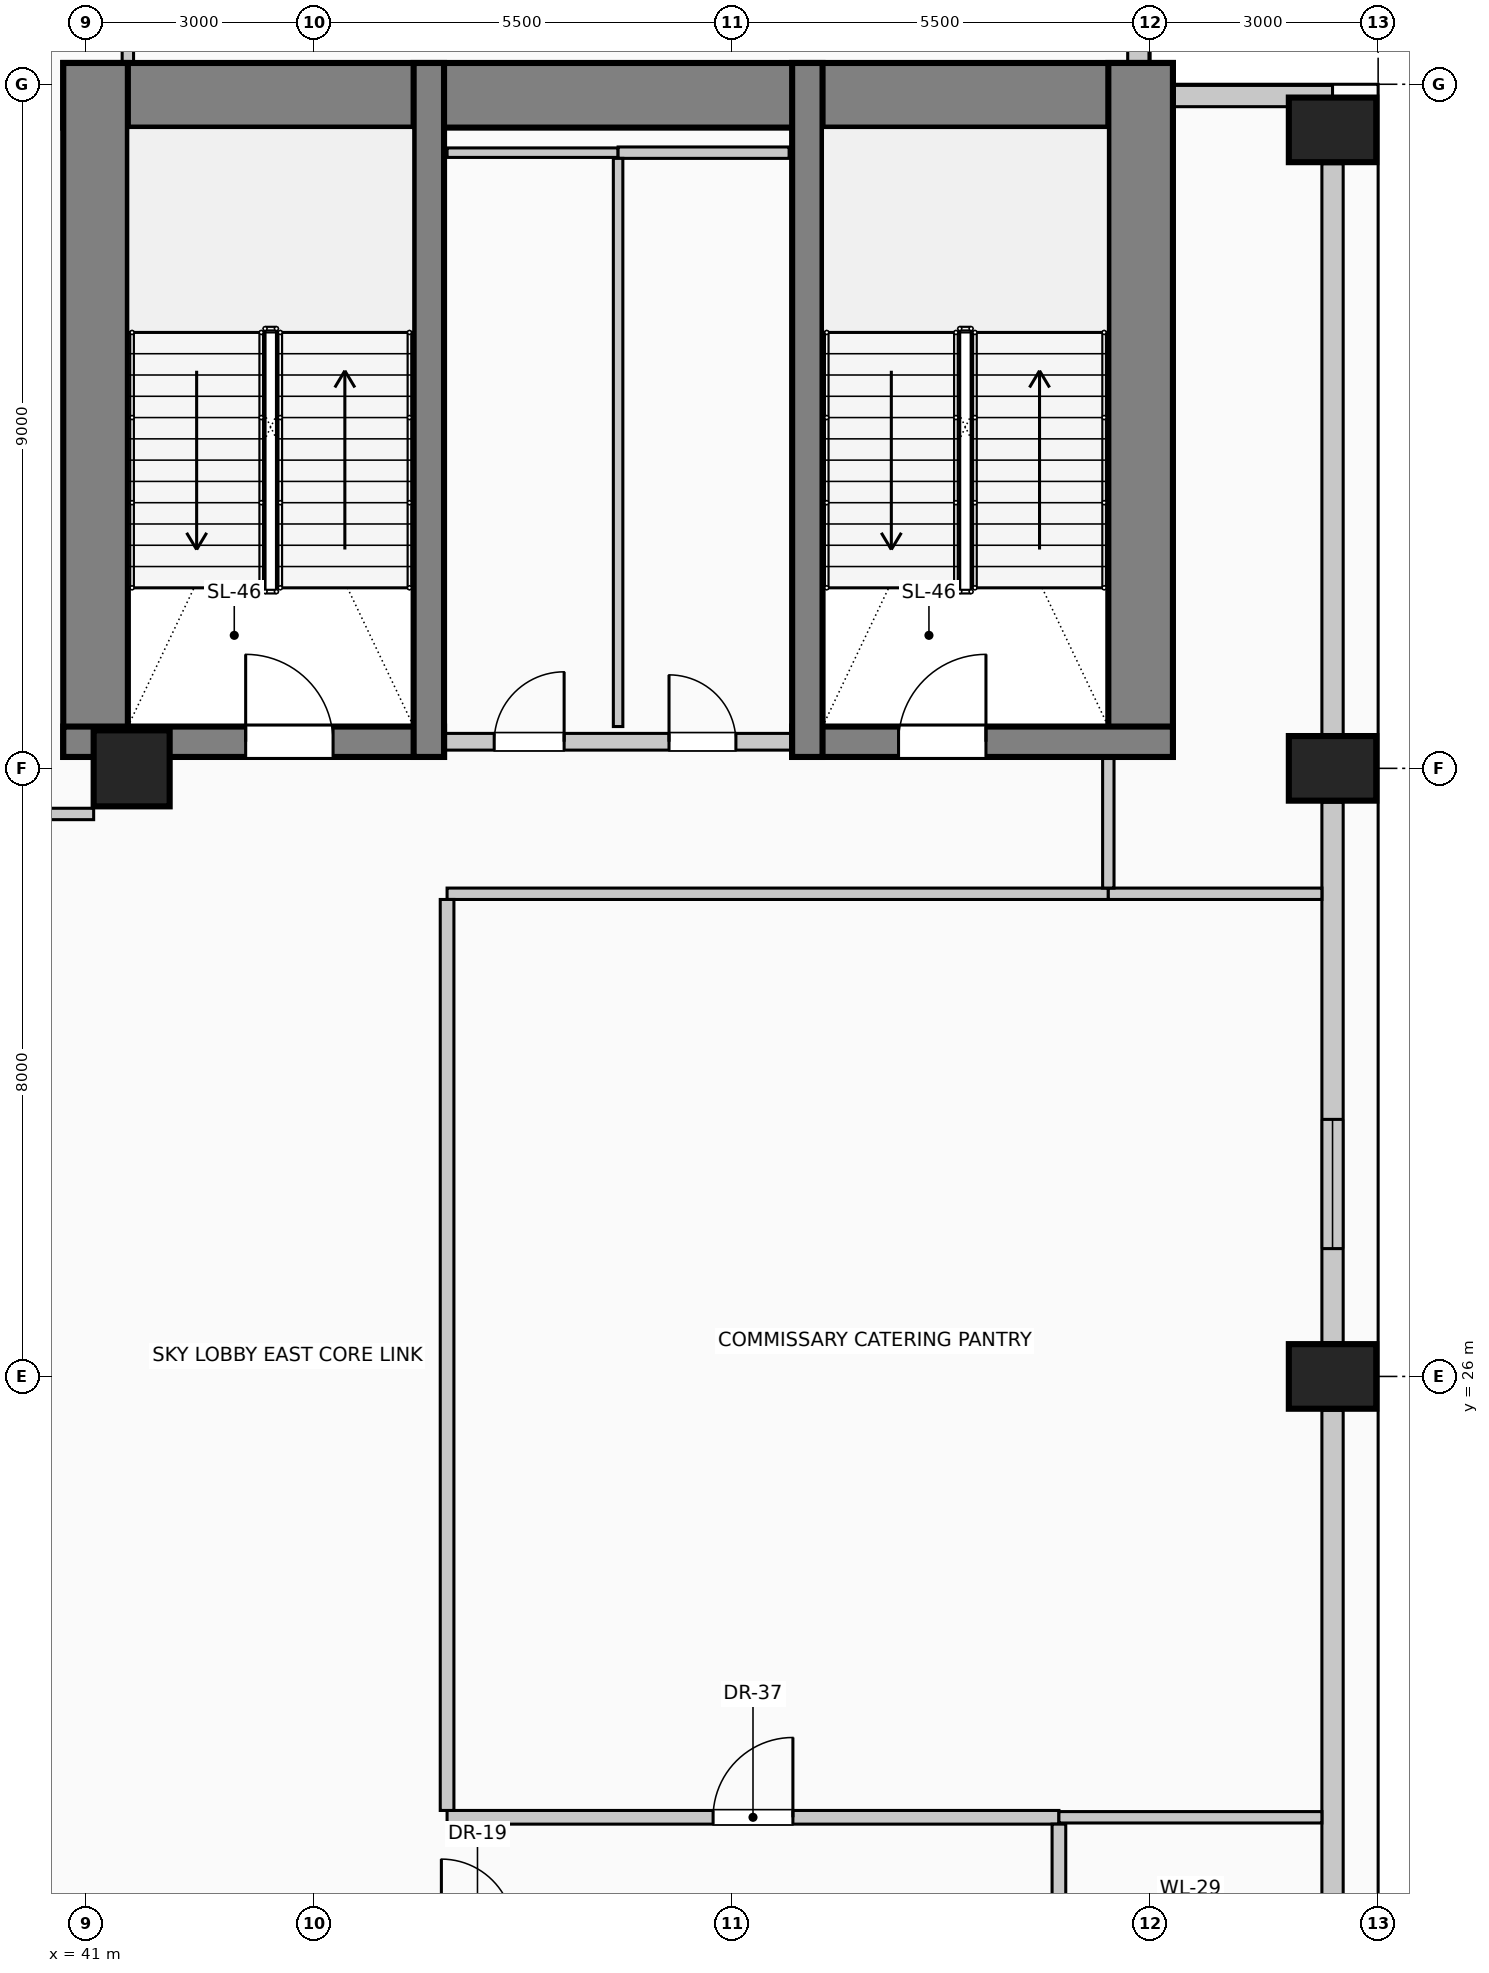
"""IFC4 building model, lengths in metres.
Left out: names, types, materials, properties, quantities, classifications, styles, units other than length and angle.
Written with IfcOpenShell. Run it as: python <this file> out.ifc"""

import sys

from ifc_helpers import new_model, si_unit, direction, frame, frame_2d, origin, origin_2d, place, context, subcontext, project, spatial, rectangle, circle, extrude, element, fill, save


model = new_model("IFC4")
c1 = context("Model", 3, precision=1e-05, world=origin(), true_north=direction((0.0, 1.0)))
c2 = subcontext(c1, "Body", "Model", "MODEL_VIEW")
j1 = project(units=[si_unit("LENGTHUNIT", "METRE"), si_unit("PLANEANGLEUNIT", "RADIAN")], contexts=[c1])
p1 = place(None, origin())
s1 = spatial("IfcSite", under=j1, at=p1, CompositionType="ELEMENT")
p2 = place(p1, origin())
s2 = spatial("IfcBuilding", under=s1, at=p2, CompositionType="ELEMENT")
p3 = place(p2, frame((0.0, 0.0, 87.8)))
s3 = spatial("IfcBuildingStorey", under=s2, at=p3, CompositionType="ELEMENT", Elevation=87.8)
p4 = place(p3, frame((40.7, 42.855, 0.0), z_axis=(0.0, 0.0, 1.0), x_axis=(1.0, 0.0, 0.0)))
e1 = element("IfcWall", 1, at=p4, inside=s3, PredefinedType="SHEAR", context=c2, shape_type="SweptSolid", body=[
    extrude(rectangle(XDim=14.6, YDim=0.85, at=frame_2d((7.3, 0.0))), origin(), (0.0, 0.0, 1.0), 4.8),
])
for number, where, z_axis, x_axis in (
    (2, (41.125, 34.15, 0.0), (0.0, 0.0, 1.0), (0.0, 1.0, 0.0)),
    (3, (54.875, 34.15, 0.0), (0.0, 0.0, 1.0), (0.0, 1.0, 0.0)),
):
    element("IfcWall", number, at=place(p3, frame(where, z_axis=z_axis, x_axis=x_axis)), inside=s3, PredefinedType="SHEAR", context=c2, shape_type="SweptSolid", body=[
        extrude(rectangle(XDim=9.13, YDim=0.85, at=frame_2d((4.565, 0.0))), origin(), (0.0, 0.0, 1.0), 4.8),
    ])
p5 = place(p3, frame((40.7, 34.35, 0.0), z_axis=(0.0, 0.0, 1.0), x_axis=(1.0, 0.0, 0.0)))
e4 = element("IfcWall", 4, at=p5, inside=s3, PredefinedType="SHEAR", context=c2, shape_type="SweptSolid", body=[
    extrude(rectangle(XDim=5.01, YDim=0.4, at=frame_2d((2.505, 0.0))), origin(), (0.0, 0.0, 1.0), 4.8),
])
p6 = place(p5, frame((2.4, 0.0, 0.0)))
e5 = element("IfcOpeningElement", 5, at=p6, cuts=e4, PredefinedType="OPENING", context=c2, shape_type="SweptSolid", body=[
    extrude(rectangle(XDim=1.15, YDim=2.2, at=frame_2d((0.575, 1.1))), frame((0.0, 0.21, 0.0), z_axis=(0.0, -1.0, 0.0), x_axis=(1.0, 0.0, 0.0)), (0.0, 0.0, 1.0), 0.42),
])
p7 = place(p3, frame((45.51, 34.15, 0.0), z_axis=(0.0, 0.0, 1.0), x_axis=(0.0, 1.0, 0.0)))
e6 = element("IfcWall", 6, at=p7, inside=s3, PredefinedType="SHEAR", context=c2, shape_type="SweptSolid", body=[
    extrude(rectangle(XDim=9.13, YDim=0.4, at=frame_2d((4.565, 0.0))), origin(), (0.0, 0.0, 1.0), 4.8),
])
p8 = place(p3, frame((50.29, 34.35, 0.0), z_axis=(0.0, 0.0, 1.0), x_axis=(1.0, 0.0, 0.0)))
e7 = element("IfcWall", 7, at=p8, inside=s3, PredefinedType="SHEAR", context=c2, shape_type="SweptSolid", body=[
    extrude(rectangle(XDim=5.01, YDim=0.4, at=frame_2d((2.505, 0.0))), origin(), (0.0, 0.0, 1.0), 4.8),
])
p9 = place(p8, frame((1.4, 0.0, 0.0)))
e8 = element("IfcOpeningElement", 8, at=p9, cuts=e7, PredefinedType="OPENING", context=c2, shape_type="SweptSolid", body=[
    extrude(rectangle(XDim=1.15, YDim=2.2, at=frame_2d((0.575, 1.1))), frame((0.0, 0.21, 0.0), z_axis=(0.0, -1.0, 0.0), x_axis=(1.0, 0.0, 0.0)), (0.0, 0.0, 1.0), 0.42),
])
p10 = place(p3, frame((50.49, 34.15, 0.0), z_axis=(0.0, 0.0, 1.0), x_axis=(0.0, 1.0, 0.0)))
e9 = element("IfcWall", 9, at=p10, inside=s3, PredefinedType="SHEAR", context=c2, shape_type="SweptSolid", body=[
    extrude(rectangle(XDim=9.13, YDim=0.4, at=frame_2d((4.565, 0.0))), origin(), (0.0, 0.0, 1.0), 4.8),
])
for number, where, z_axis, x_axis in (
    (10, (57.4, 26.0, 0.0), (0.0, 0.0, 1.0), (0.0, 1.0, 0.0)),
    (11, (57.4, 34.0, 0.0), (0.0, 0.0, 1.0), (0.0, 1.0, 0.0)),
    (12, (57.4, 42.4, 0.0), (0.0, 0.0, 1.0), (0.0, 1.0, 0.0)),
):
    element("IfcColumn", number, at=place(p3, frame(where, z_axis=z_axis, x_axis=x_axis)), inside=s3, PredefinedType="COLUMN", context=c2, shape_type="SweptSolid", body=[
        extrude(rectangle(XDim=0.85, YDim=1.15, at=origin_2d()), origin(), (0.0, 0.0, 1.0), 4.8),
    ])
p11 = place(p3, frame((41.6, 34.0, 0.0), z_axis=(0.0, 0.0, 1.0), x_axis=(1.0, 0.0, 0.0)))
e13 = element("IfcColumn", 13, at=p11, inside=s3, PredefinedType="COLUMN", context=c2, shape_type="SweptSolid", body=[
    extrude(circle(Radius=0.5, at=origin_2d()), origin(), (0.0, 0.0, 1.0), 4.8),
])
p12 = place(p3, frame((57.4, 25.555, 0.0), z_axis=(0.0, 0.0, 1.0), x_axis=(0.0, -1.0, 0.0)))
e14 = element("IfcWall", 14, at=p12, inside=s3, PredefinedType="SOLIDWALL", context=c2, shape_type="SweptSolid", body=[
    extrude(rectangle(XDim=7.11, YDim=0.28, at=frame_2d((3.555, 0.0))), origin(), (0.0, 0.0, 1.0), 3.675),
])
p13 = place(p3, frame((57.4, 33.555, 0.0), z_axis=(0.0, 0.0, 1.0), x_axis=(0.0, -1.0, 0.0)))
e15 = element("IfcWall", 15, at=p13, inside=s3, PredefinedType="SOLIDWALL", context=c2, shape_type="SweptSolid", body=[
    extrude(rectangle(XDim=7.11, YDim=0.28, at=frame_2d((3.555, 0.0))), origin(), (0.0, 0.0, 1.0), 3.675),
])
p14 = place(p13, frame((4.173, 0.0, 0.5)))
e16 = element("IfcOpeningElement", 16, at=p14, cuts=e15, PredefinedType="OPENING", context=c2, shape_type="SweptSolid", body=[
    extrude(rectangle(XDim=1.7, YDim=1.95, at=frame_2d((0.85, 0.975))), frame((0.0, 0.15, 0.0), z_axis=(0.0, -1.0, 0.0), x_axis=(1.0, 0.0, 0.0)), (0.0, 0.0, 1.0), 0.3),
])
p15 = place(p3, frame((57.4, 41.955, 0.0), z_axis=(0.0, 0.0, 1.0), x_axis=(0.0, -1.0, 0.0)))
e17 = element("IfcWall", 17, at=p15, inside=s3, PredefinedType="SOLIDWALL", context=c2, shape_type="SweptSolid", body=[
    extrude(rectangle(XDim=7.51, YDim=0.28, at=frame_2d((3.755, 0.0))), origin(), (0.0, 0.0, 1.0), 3.675),
])
p16 = place(p3, frame((54.845, 45.4, 0.0), z_axis=(0.0, 0.0, 1.0), x_axis=(0.0, -1.0, 0.0)))
e18 = element("IfcWall", 18, at=p16, inside=s3, PredefinedType="SOLIDWALL", context=c2, shape_type="SweptSolid", body=[
    extrude(rectangle(XDim=2.115, YDim=0.28, at=frame_2d((1.058, 0.0))), origin(), (0.0, 0.0, 1.0), 4.525),
])
p17 = place(p3, frame((55.305, 42.845, 0.0), z_axis=(0.0, 0.0, 1.0), x_axis=(1.0, 0.0, 0.0)))
e19 = element("IfcWall", 19, at=p17, inside=s3, PredefinedType="SOLIDWALL", context=c2, shape_type="SweptSolid", body=[
    extrude(rectangle(XDim=2.095, YDim=0.28, at=frame_2d((1.047, 0.0))), origin(), (0.0, 0.0, 1.0), 4.525),
])
p18 = place(p3, frame((45.72, 34.35, 0.0), z_axis=(0.0, 0.0, 1.0), x_axis=(1.0, 0.0, 0.0)))
e20 = element("IfcWall", 20, at=p18, inside=s3, PredefinedType="PARTITIONING", context=c2, shape_type="SweptSolid", body=[
    extrude(rectangle(XDim=4.56, YDim=0.22, at=frame_2d((2.28, 0.0))), origin(), (0.0, 0.0, 1.0), 4.525),
])
p19 = place(p18, frame((0.65, 0.0, 0.0)))
e21 = element("IfcOpeningElement", 21, at=p19, cuts=e20, PredefinedType="OPENING", context=c2, shape_type="SweptSolid", body=[
    extrude(rectangle(XDim=0.92, YDim=2.1, at=frame_2d((0.46, 1.05))), frame((0.0, 0.12, 0.0), z_axis=(0.0, -1.0, 0.0), x_axis=(1.0, 0.0, 0.0)), (0.0, 0.0, 1.0), 0.24),
])
p20 = place(p18, frame((2.95, 0.0, 0.0)))
e22 = element("IfcOpeningElement", 22, at=p20, cuts=e20, PredefinedType="OPENING", context=c2, shape_type="SweptSolid", body=[
    extrude(rectangle(XDim=0.88, YDim=2.1, at=frame_2d((0.44, 1.05))), frame((0.0, 0.12, 0.0), z_axis=(0.0, -1.0, 0.0), x_axis=(1.0, 0.0, 0.0)), (0.0, 0.0, 1.0), 0.24),
])
p21 = place(p3, frame((45.75, 20.2, 0.0), z_axis=(0.0, 0.0, 1.0), x_axis=(1.0, 0.0, 0.0)))
e23 = element("IfcWall", 23, at=p21, inside=s3, PredefinedType="PARTITIONING", context=c2, shape_type="SweptSolid", body=[
    extrude(rectangle(XDim=8.05, YDim=0.18, at=frame_2d((4.025, 0.0))), origin(), (0.0, 0.0, 1.0), 4.525),
])
p22 = place(p21, frame((3.5, 0.0, 0.0)))
e24 = element("IfcOpeningElement", 24, at=p22, cuts=e23, PredefinedType="OPENING", context=c2, shape_type="SweptSolid", body=[
    extrude(rectangle(XDim=1.05, YDim=2.15, at=frame_2d((0.525, 1.075))), frame((0.0, 0.1, 0.0), z_axis=(0.0, -1.0, 0.0), x_axis=(1.0, 0.0, 0.0)), (0.0, 0.0, 1.0), 0.2),
])
p23 = place(p3, frame((53.8, 20.2, 0.0), z_axis=(0.0, 0.0, 1.0), x_axis=(1.0, 0.0, 0.0)))
e25 = element("IfcWall", 25, at=p23, inside=s3, PredefinedType="PARTITIONING", context=c2, shape_type="SweptSolid", body=[
    extrude(rectangle(XDim=3.46, YDim=0.15, at=frame_2d((1.73, 0.0))), origin(), (0.0, 0.0, 1.0), 4.525),
])
p24 = place(p3, frame((45.75, 32.35, 0.0), z_axis=(0.0, 0.0, 1.0), x_axis=(1.0, 0.0, 0.0)))
e26 = element("IfcWall", 26, at=p24, inside=s3, PredefinedType="PARTITIONING", context=c2, shape_type="SweptSolid", body=[
    extrude(rectangle(XDim=8.7, YDim=0.15, at=frame_2d((4.35, 0.0))), origin(), (0.0, 0.0, 1.0), 4.525),
])
p25 = place(p3, frame((54.45, 32.35, 0.0), z_axis=(0.0, 0.0, 1.0), x_axis=(1.0, 0.0, 0.0)))
e27 = element("IfcWall", 27, at=p25, inside=s3, PredefinedType="PARTITIONING", context=c2, shape_type="SweptSolid", body=[
    extrude(rectangle(XDim=2.81, YDim=0.15, at=frame_2d((1.405, 0.0))), origin(), (0.0, 0.0, 1.0), 4.525),
])
p26 = place(p3, frame((29.5, 33.4, 0.0), z_axis=(0.0, 0.0, 1.0), x_axis=(1.0, 0.0, 0.0)))
e28 = element("IfcWall", 28, at=p26, inside=s3, PredefinedType="PARTITIONING", context=c2, shape_type="SweptSolid", body=[
    extrude(rectangle(XDim=11.6, YDim=0.15, at=frame_2d((5.8, 0.0))), origin(), (0.0, 0.0, 1.0), 4.525),
])
p27 = place(p3, frame((45.75, 42.1, 0.0), z_axis=(0.0, 0.0, 1.0), x_axis=(1.0, 0.0, 0.0)))
e29 = element("IfcWall", 29, at=p27, inside=s3, PredefinedType="PARTITIONING", context=c2, shape_type="SweptSolid", body=[
    extrude(rectangle(XDim=2.25, YDim=0.125, at=frame_2d((1.125, 0.0))), origin(), (0.0, 0.0, 1.0), 4.525),
])
p28 = place(p3, frame((48.0, 42.1, 0.0), z_axis=(0.0, 0.0, 1.0), x_axis=(1.0, 0.0, 0.0)))
e30 = element("IfcWall", 30, at=p28, inside=s3, PredefinedType="PARTITIONING", context=c2, shape_type="SweptSolid", body=[
    extrude(rectangle(XDim=2.25, YDim=0.15, at=frame_2d((1.125, 0.0))), origin(), (0.0, 0.0, 1.0), 4.525),
])
p29 = place(p3, frame((41.55, 43.28, 0.0), z_axis=(0.0, 0.0, 1.0), x_axis=(0.0, 1.0, 0.0)))
e31 = element("IfcWall", 31, at=p29, inside=s3, PredefinedType="PARTITIONING", context=c2, shape_type="SweptSolid", body=[
    extrude(rectangle(XDim=1.42, YDim=0.15, at=frame_2d((0.71, 0.0))), origin(), (0.0, 0.0, 1.0), 4.525),
])
p30 = place(p3, frame((45.75, 20.29, 0.0), z_axis=(0.0, 0.0, 1.0), x_axis=(0.0, 1.0, 0.0)))
e32 = element("IfcWall", 32, at=p30, inside=s3, PredefinedType="PARTITIONING", context=c2, shape_type="SweptSolid", body=[
    extrude(rectangle(XDim=11.985, YDim=0.18, at=frame_2d((5.992, 0.0))), origin(), (0.0, 0.0, 1.0), 4.525),
])
p31 = place(p3, frame((48.0, 34.55, 0.0), z_axis=(0.0, 0.0, 1.0), x_axis=(0.0, 1.0, 0.0)))
e33 = element("IfcWall", 33, at=p31, inside=s3, PredefinedType="PARTITIONING", context=c2, shape_type="SweptSolid", body=[
    extrude(rectangle(XDim=7.475, YDim=0.125, at=frame_2d((3.737, 0.0))), origin(), (0.0, 0.0, 1.0), 4.525),
])
p32 = place(p3, frame((53.8, 18.79, 0.0), z_axis=(0.0, 0.0, 1.0), x_axis=(0.0, 1.0, 0.0)))
e34 = element("IfcWall", 34, at=p32, inside=s3, PredefinedType="PARTITIONING", context=c2, shape_type="SweptSolid", body=[
    extrude(rectangle(XDim=1.32, YDim=0.18, at=frame_2d((0.66, 0.0))), origin(), (0.0, 0.0, 1.0), 4.525),
])
p33 = place(p3, frame((54.45, 32.425, 0.0), z_axis=(0.0, 0.0, 1.0), x_axis=(0.0, 1.0, 0.0)))
e35 = element("IfcWall", 35, at=p33, inside=s3, PredefinedType="PARTITIONING", context=c2, shape_type="SweptSolid", body=[
    extrude(rectangle(XDim=1.725, YDim=0.15, at=frame_2d((0.862, 0.0))), origin(), (0.0, 0.0, 1.0), 4.525),
])
p34 = place(p14, origin())
e36 = element("IfcWindow", 36, at=p34, inside=s3, PartitioningType="SINGLE_PANEL", PredefinedType="WINDOW", context=c2, shape_type="SweptSolid", body=[
    extrude(rectangle(XDim=1.7, YDim=1.95, at=frame_2d((0.85, 0.975))), frame((0.0, 0.03, 0.0), z_axis=(0.0, -1.0, 0.0), x_axis=(1.0, 0.0, 0.0)), (0.0, 0.0, 1.0), 0.06),
])
fill(e16, e36)
p35 = place(p6, origin())
e37 = element("IfcDoor", 37, at=p35, inside=s3, OperationType="SINGLE_SWING_LEFT", PredefinedType="DOOR", context=c2, shape_type="SweptSolid", body=[
    extrude(rectangle(XDim=1.15, YDim=2.2, at=frame_2d((0.575, 1.1))), frame((0.0, 0.025, 0.0), z_axis=(0.0, -1.0, 0.0), x_axis=(1.0, 0.0, 0.0)), (0.0, 0.0, 1.0), 0.05),
])
fill(e5, e37)
p36 = place(p19, origin())
e38 = element("IfcDoor", 38, at=p36, inside=s3, OperationType="SINGLE_SWING_RIGHT", PredefinedType="DOOR", context=c2, shape_type="SweptSolid", body=[
    extrude(rectangle(XDim=0.92, YDim=2.1, at=frame_2d((0.46, 1.05))), frame((0.0, 0.025, 0.0), z_axis=(0.0, -1.0, 0.0), x_axis=(1.0, 0.0, 0.0)), (0.0, 0.0, 1.0), 0.05),
])
fill(e21, e38)
p37 = place(p20, origin())
e39 = element("IfcDoor", 39, at=p37, inside=s3, OperationType="SINGLE_SWING_LEFT", PredefinedType="DOOR", context=c2, shape_type="SweptSolid", body=[
    extrude(rectangle(XDim=0.88, YDim=2.1, at=frame_2d((0.44, 1.05))), frame((0.0, 0.025, 0.0), z_axis=(0.0, -1.0, 0.0), x_axis=(1.0, 0.0, 0.0)), (0.0, 0.0, 1.0), 0.05),
])
fill(e22, e39)
p38 = place(p9, origin())
e40 = element("IfcDoor", 40, at=p38, inside=s3, OperationType="SINGLE_SWING_RIGHT", PredefinedType="DOOR", context=c2, shape_type="SweptSolid", body=[
    extrude(rectangle(XDim=1.15, YDim=2.2, at=frame_2d((0.575, 1.1))), frame((0.0, 0.025, 0.0), z_axis=(0.0, -1.0, 0.0), x_axis=(1.0, 0.0, 0.0)), (0.0, 0.0, 1.0), 0.05),
])
fill(e8, e40)
p39 = place(p22, origin())
e41 = element("IfcDoor", 41, at=p39, inside=s3, OperationType="SINGLE_SWING_RIGHT", PredefinedType="DOOR", context=c2, shape_type="SweptSolid", body=[
    extrude(rectangle(XDim=1.05, YDim=2.15, at=frame_2d((0.525, 1.075))), frame((0.0, 0.025, 0.0), z_axis=(0.0, -1.0, 0.0), x_axis=(1.0, 0.0, 0.0)), (0.0, 0.0, 1.0), 0.05),
])
fill(e24, e41)
save(model, sys.argv[1])
